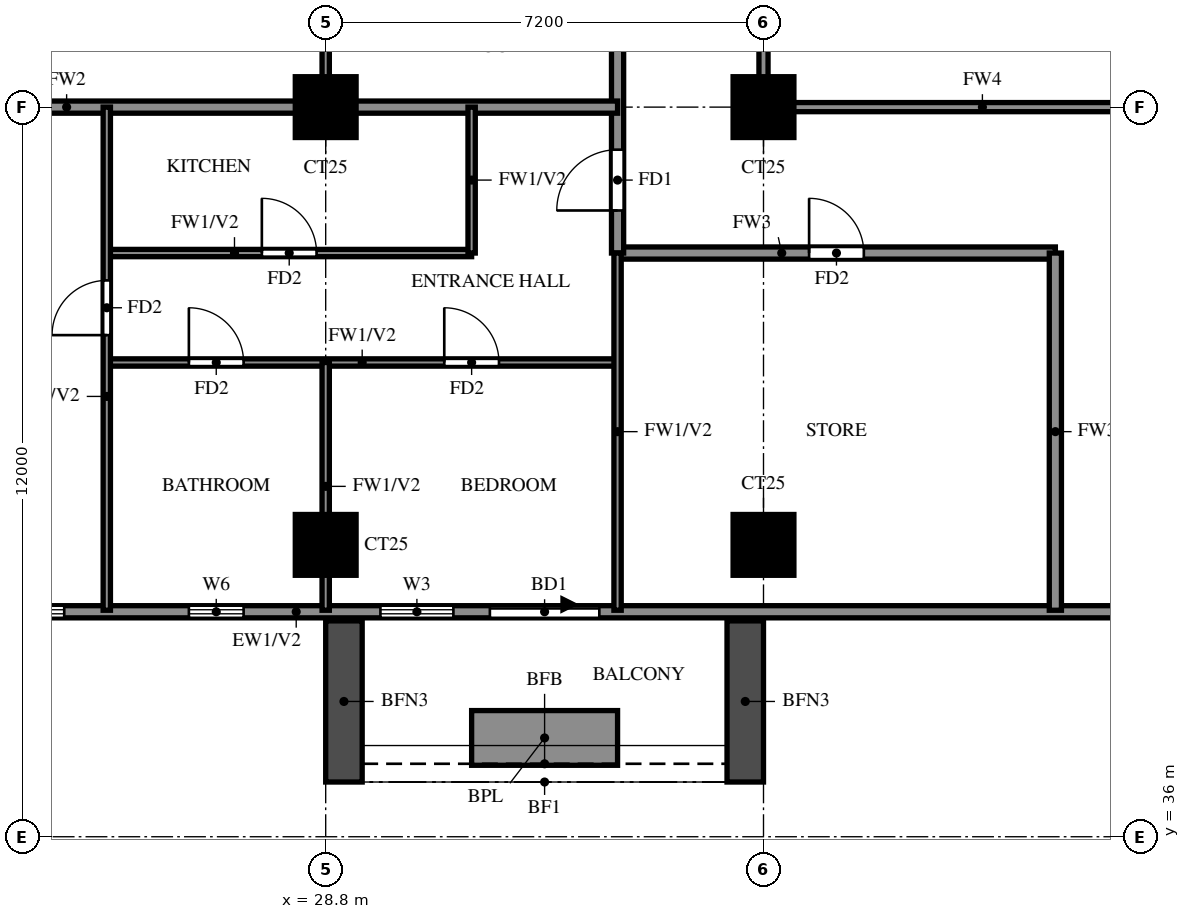
"""IFC4 building model, lengths in metres.
Left out: names, types, materials, properties, quantities, classifications, styles, units other than length and angle.
Written with IfcOpenShell. Run it as: python <this file> out.ifc"""

import sys

from ifc_helpers import new_model, si_unit, direction, frame, frame_2d, origin, origin_2d, place, context, subcontext, project, spatial, rectangle, extrude, source, transform, mapped, element, fill, save


model = new_model("IFC4")
c1 = context("Model", 3, precision=1e-05, world=origin(), true_north=direction((0.0, 1.0)))
c2 = subcontext(c1, "Body", "Model", "MODEL_VIEW")
j1 = project(units=[si_unit("LENGTHUNIT", "METRE"), si_unit("PLANEANGLEUNIT", "RADIAN")], contexts=[c1])
p1 = place(None, origin())
s1 = spatial("IfcSite", under=j1, at=p1, CompositionType="ELEMENT")
p2 = place(p1, origin())
s2 = spatial("IfcBuilding", under=s1, at=p2, CompositionType="ELEMENT")
p3 = place(p2, frame((0.0, 0.0, 150.0)))
s3 = spatial("IfcBuildingStorey", under=s2, at=p3, CompositionType="ELEMENT", Elevation=150.0)
m1 = source(origin(), c2, "Body", "SweptSolid", [
    extrude(rectangle(XDim=1.0, YDim=1.0, at=origin_2d()), origin(), (0.0, 0.0, 1.0), 3.2),
])
for number, where, z_axis, x_axis in (
    (1, (28.8, 40.8, 0.0), (0.0, 0.0, 1.0), (1.0, 0.0, 0.0)),
    (2, (36.0, 40.8, 0.0), (0.0, 0.0, 1.0), (1.0, 0.0, 0.0)),
    (3, (28.8, 48.0, 0.0), (0.0, 0.0, 1.0), (1.0, 0.0, 0.0)),
    (4, (36.0, 48.0, 0.0), (0.0, 0.0, 1.0), (1.0, 0.0, 0.0)),
):
    element("IfcColumn", number, at=place(p3, frame(where, z_axis=z_axis, x_axis=x_axis)), inside=s3, PredefinedType="COLUMN", context=c2, shape_type="MappedRepresentation", body=[
        mapped(m1, transform((0.0, 0.0, 0.0))),
    ])
p4 = place(p3, frame((18.2, 39.7, 0.0), z_axis=(0.0, 0.0, 1.0), x_axis=(1.0, 0.0, 0.0)))
e5 = element("IfcWall", 5, at=p4, inside=s3, PredefinedType="SOLIDWALL", context=c2, shape_type="SweptSolid", body=[
    extrude(rectangle(XDim=23.8, YDim=0.2, at=frame_2d((11.9, 0.0))), origin(), (0.0, 0.0, 1.0), 3.2),
])
p5 = place(p4, frame((13.3, 0.0, 0.0)))
e6 = element("IfcOpeningElement", 6, at=p5, cuts=e5, PredefinedType="OPENING", context=c2, shape_type="SweptSolid", body=[
    extrude(rectangle(XDim=1.8, YDim=2.4, at=frame_2d((0.9, 1.2))), frame((0.0, 0.11, 0.0), z_axis=(0.0, -1.0, 0.0), x_axis=(1.0, 0.0, 0.0)), (0.0, 0.0, 1.0), 0.22),
])
p6 = place(p4, frame((0.9, 0.0, 0.6)))
e7 = element("IfcOpeningElement", 7, at=p6, cuts=e5, PredefinedType="OPENING", context=c2, shape_type="SweptSolid", body=[
    extrude(rectangle(XDim=2.4, YDim=2.4, at=frame_2d((1.2, 1.2))), frame((0.0, 0.11, 0.0), z_axis=(0.0, -1.0, 0.0), x_axis=(1.0, 0.0, 0.0)), (0.0, 0.0, 1.0), 0.22),
])
p7 = place(p4, frame((3.9, 0.0, 0.6)))
e8 = element("IfcOpeningElement", 8, at=p7, cuts=e5, PredefinedType="OPENING", context=c2, shape_type="SweptSolid", body=[
    extrude(rectangle(XDim=2.4, YDim=2.4, at=frame_2d((1.2, 1.2))), frame((0.0, 0.11, 0.0), z_axis=(0.0, -1.0, 0.0), x_axis=(1.0, 0.0, 0.0)), (0.0, 0.0, 1.0), 0.22),
])
p8 = place(p4, frame((8.35, 0.0, 1.5)))
e9 = element("IfcOpeningElement", 9, at=p8, cuts=e5, PredefinedType="OPENING", context=c2, shape_type="SweptSolid", body=[
    extrude(rectangle(XDim=0.9, YDim=0.9, at=frame_2d((0.45, 0.45))), frame((0.0, 0.11, 0.0), z_axis=(0.0, -1.0, 0.0), x_axis=(1.0, 0.0, 0.0)), (0.0, 0.0, 1.0), 0.22),
])
p9 = place(p4, frame((11.5, 0.0, 0.6)))
e10 = element("IfcOpeningElement", 10, at=p9, cuts=e5, PredefinedType="OPENING", context=c2, shape_type="SweptSolid", body=[
    extrude(rectangle(XDim=1.2, YDim=2.4, at=frame_2d((0.6, 1.2))), frame((0.0, 0.11, 0.0), z_axis=(0.0, -1.0, 0.0), x_axis=(1.0, 0.0, 0.0)), (0.0, 0.0, 1.0), 0.22),
])
for number, where, z_axis, x_axis in (
    (11, (29.1, 39.55, 0.0), (0.0, 0.0, 1.0), (0.0, -1.0, 0.0)),
    (12, (35.7, 39.55, 0.0), (0.0, 0.0, 1.0), (0.0, -1.0, 0.0)),
):
    element("IfcWall", number, at=place(p3, frame(where, z_axis=z_axis, x_axis=x_axis)), inside=s3, PredefinedType="SOLIDWALL", context=c2, shape_type="SweptSolid", body=[
        extrude(rectangle(XDim=2.65, YDim=0.6, at=frame_2d((1.325, 0.0))), origin(), (0.0, 0.0, 1.0), 2.85),
    ])
p10 = place(p3, frame((31.2, 37.625, 0.0), z_axis=(0.0, 0.0, 1.0), x_axis=(1.0, 0.0, 0.0)))
e13 = element("IfcWall", 13, at=p10, inside=s3, PredefinedType="SOLIDWALL", context=c2, shape_type="SweptSolid", body=[
    extrude(rectangle(XDim=2.4, YDim=0.9, at=frame_2d((1.2, 0.0))), origin(), (0.0, 0.0, 1.0), 0.9),
])
p11 = place(p3, frame((33.6, 45.6, 0.0), z_axis=(0.0, 0.0, 1.0), x_axis=(1.0, 0.0, 0.0)))
e14 = element("IfcWall", 14, at=p11, inside=s3, PredefinedType="SOLIDWALL", context=c2, shape_type="SweptSolid", body=[
    extrude(rectangle(XDim=7.2, YDim=0.2, at=frame_2d((3.6, 0.0))), origin(), (0.0, 0.0, 1.0), 3.2),
])
p12 = place(p11, frame((3.15, 0.0, 0.0)))
e15 = element("IfcOpeningElement", 15, at=p12, cuts=e14, PredefinedType="OPENING", context=c2, shape_type="SweptSolid", body=[
    extrude(rectangle(XDim=0.9, YDim=2.1, at=frame_2d((0.45, 1.05))), frame((0.0, 0.11, 0.0), z_axis=(0.0, -1.0, 0.0), x_axis=(1.0, 0.0, 0.0)), (0.0, 0.0, 1.0), 0.22),
])
p13 = place(p3, frame((33.6, 45.6, 0.0), z_axis=(0.0, 0.0, 1.0), x_axis=(0.0, 1.0, 0.0)))
e16 = element("IfcWall", 16, at=p13, inside=s3, PredefinedType="SOLIDWALL", context=c2, shape_type="SweptSolid", body=[
    extrude(rectangle(XDim=16.8, YDim=0.2, at=frame_2d((8.4, 0.0))), origin(), (0.0, 0.0, 1.0), 3.2),
])
p14 = place(p13, frame((0.7, 0.0, 0.0)))
e17 = element("IfcOpeningElement", 17, at=p14, cuts=e16, PredefinedType="OPENING", context=c2, shape_type="SweptSolid", body=[
    extrude(rectangle(XDim=1.0, YDim=2.1, at=frame_2d((0.5, 1.05))), frame((0.0, 0.11, 0.0), z_axis=(0.0, -1.0, 0.0), x_axis=(1.0, 0.0, 0.0)), (0.0, 0.0, 1.0), 0.22),
])
p15 = place(p13, frame((6.7, 0.0, 0.0)))
e18 = element("IfcOpeningElement", 18, at=p15, cuts=e16, PredefinedType="OPENING", context=c2, shape_type="SweptSolid", body=[
    extrude(rectangle(XDim=1.0, YDim=2.1, at=frame_2d((0.5, 1.05))), frame((0.0, 0.11, 0.0), z_axis=(0.0, -1.0, 0.0), x_axis=(1.0, 0.0, 0.0)), (0.0, 0.0, 1.0), 0.22),
])
p16 = place(p13, frame((15.1, 0.0, 0.0)))
e19 = element("IfcOpeningElement", 19, at=p16, cuts=e16, PredefinedType="OPENING", context=c2, shape_type="SweptSolid", body=[
    extrude(rectangle(XDim=1.0, YDim=2.1, at=frame_2d((0.5, 1.05))), frame((0.0, 0.11, 0.0), z_axis=(0.0, -1.0, 0.0), x_axis=(1.0, 0.0, 0.0)), (0.0, 0.0, 1.0), 0.22),
])
p17 = place(p3, frame((40.8, 39.725, 0.0), z_axis=(0.0, 0.0, 1.0), x_axis=(0.0, 1.0, 0.0)))
e20 = element("IfcWall", 20, at=p17, inside=s3, PredefinedType="SOLIDWALL", context=c2, shape_type="SweptSolid", body=[
    extrude(rectangle(XDim=5.875, YDim=0.2, at=frame_2d((2.938, 0.0))), origin(), (0.0, 0.0, 1.0), 3.2),
])
p18 = place(p3, frame((14.525, 48.0, 0.0), z_axis=(0.0, 0.0, 1.0), x_axis=(1.0, 0.0, 0.0)))
e21 = element("IfcWall", 21, at=p18, inside=s3, PredefinedType="SOLIDWALL", context=c2, shape_type="SweptSolid", body=[
    extrude(rectangle(XDim=19.075, YDim=0.2, at=frame_2d((9.538, 0.0))), origin(), (0.0, 0.0, 1.0), 3.2),
])
p19 = place(p3, frame((25.2, 43.8, 0.0), z_axis=(0.0, 0.0, 1.0), x_axis=(1.0, 0.0, 0.0)))
e22 = element("IfcWall", 22, at=p19, inside=s3, PredefinedType="PARTITIONING", context=c2, shape_type="SweptSolid", body=[
    extrude(rectangle(XDim=8.4, YDim=0.12, at=frame_2d((4.2, 0.0))), origin(), (0.0, 0.0, 1.0), 3.2),
])
p20 = place(p19, frame((1.35, 0.0, 0.0)))
e23 = element("IfcOpeningElement", 23, at=p20, cuts=e22, PredefinedType="OPENING", context=c2, shape_type="SweptSolid", body=[
    extrude(rectangle(XDim=0.9, YDim=2.1, at=frame_2d((0.45, 1.05))), frame((0.0, 0.07, 0.0), z_axis=(0.0, -1.0, 0.0), x_axis=(1.0, 0.0, 0.0)), (0.0, 0.0, 1.0), 0.14),
])
p21 = place(p19, frame((5.55, 0.0, 0.0)))
e24 = element("IfcOpeningElement", 24, at=p21, cuts=e22, PredefinedType="OPENING", context=c2, shape_type="SweptSolid", body=[
    extrude(rectangle(XDim=0.9, YDim=2.1, at=frame_2d((0.45, 1.05))), frame((0.0, 0.07, 0.0), z_axis=(0.0, -1.0, 0.0), x_axis=(1.0, 0.0, 0.0)), (0.0, 0.0, 1.0), 0.14),
])
p22 = place(p3, frame((25.2, 45.6, 0.0), z_axis=(0.0, 0.0, 1.0), x_axis=(1.0, 0.0, 0.0)))
e25 = element("IfcWall", 25, at=p22, inside=s3, PredefinedType="PARTITIONING", context=c2, shape_type="SweptSolid", body=[
    extrude(rectangle(XDim=6.0, YDim=0.12, at=frame_2d((3.0, 0.0))), origin(), (0.0, 0.0, 1.0), 3.2),
])
p23 = place(p22, frame((2.55, 0.0, 0.0)))
e26 = element("IfcOpeningElement", 26, at=p23, cuts=e25, PredefinedType="OPENING", context=c2, shape_type="SweptSolid", body=[
    extrude(rectangle(XDim=0.9, YDim=2.1, at=frame_2d((0.45, 1.05))), frame((0.0, 0.07, 0.0), z_axis=(0.0, -1.0, 0.0), x_axis=(1.0, 0.0, 0.0)), (0.0, 0.0, 1.0), 0.14),
])
p24 = place(p3, frame((25.2, 39.725, 0.0), z_axis=(0.0, 0.0, 1.0), x_axis=(0.0, 1.0, 0.0)))
e27 = element("IfcWall", 27, at=p24, inside=s3, PredefinedType="PARTITIONING", context=c2, shape_type="SweptSolid", body=[
    extrude(rectangle(XDim=8.275, YDim=0.12, at=frame_2d((4.137, 0.0))), origin(), (0.0, 0.0, 1.0), 3.2),
])
p25 = place(p24, frame((4.525, 0.0, 0.0)))
e28 = element("IfcOpeningElement", 28, at=p25, cuts=e27, PredefinedType="OPENING", context=c2, shape_type="SweptSolid", body=[
    extrude(rectangle(XDim=0.9, YDim=2.1, at=frame_2d((0.45, 1.05))), frame((0.0, 0.07, 0.0), z_axis=(0.0, -1.0, 0.0), x_axis=(1.0, 0.0, 0.0)), (0.0, 0.0, 1.0), 0.14),
])
p26 = place(p3, frame((28.8, 39.725, 0.0), z_axis=(0.0, 0.0, 1.0), x_axis=(0.0, 1.0, 0.0)))
e29 = element("IfcWall", 29, at=p26, inside=s3, PredefinedType="PARTITIONING", context=c2, shape_type="SweptSolid", body=[
    extrude(rectangle(XDim=4.075, YDim=0.12, at=frame_2d((2.038, 0.0))), origin(), (0.0, 0.0, 1.0), 3.2),
])
p27 = place(p3, frame((28.8, 48.0, 0.0), z_axis=(0.0, 0.0, 1.0), x_axis=(0.0, 1.0, 0.0)))
e30 = element("IfcWall", 30, at=p27, inside=s3, PredefinedType="PARTITIONING", context=c2, shape_type="SweptSolid", body=[
    extrude(rectangle(XDim=3.6, YDim=0.12, at=frame_2d((1.8, 0.0))), origin(), (0.0, 0.0, 1.0), 3.2),
])
p28 = place(p3, frame((31.2, 45.6, 0.0), z_axis=(0.0, 0.0, 1.0), x_axis=(0.0, 1.0, 0.0)))
e31 = element("IfcWall", 31, at=p28, inside=s3, PredefinedType="PARTITIONING", context=c2, shape_type="SweptSolid", body=[
    extrude(rectangle(XDim=2.4, YDim=0.12, at=frame_2d((1.2, 0.0))), origin(), (0.0, 0.0, 1.0), 3.2),
])
p29 = place(p3, frame((33.6, 39.725, 0.0), z_axis=(0.0, 0.0, 1.0), x_axis=(0.0, 1.0, 0.0)))
e32 = element("IfcWall", 32, at=p29, inside=s3, PredefinedType="PARTITIONING", context=c2, shape_type="SweptSolid", body=[
    extrude(rectangle(XDim=5.875, YDim=0.12, at=frame_2d((2.938, 0.0))), origin(), (0.0, 0.0, 1.0), 3.2),
])
p30 = place(p3, frame((36.0, 48.0, 0.0), z_axis=(0.0, 0.0, 1.0), x_axis=(1.0, 0.0, 0.0)))
e33 = element("IfcWall", 33, at=p30, inside=s3, PredefinedType="SOLIDWALL", context=c2, shape_type="SweptSolid", body=[
    extrude(rectangle(XDim=7.2, YDim=0.15, at=frame_2d((3.6, 0.0))), origin(), (0.0, 0.0, 1.0), 2.3),
])
p31 = place(p3, frame((36.0, 48.0, 0.0), z_axis=(0.0, 0.0, 1.0), x_axis=(0.0, 1.0, 0.0)))
e34 = element("IfcWall", 34, at=p31, inside=s3, PredefinedType="SOLIDWALL", context=c2, shape_type="SweptSolid", body=[
    extrude(rectangle(XDim=14.4, YDim=0.15, at=frame_2d((7.2, 0.0))), origin(), (0.0, 0.0, 1.0), 2.3),
])
p32 = place(p5, origin())
e35 = element("IfcDoor", 35, at=p32, inside=s3, OperationType="DOUBLE_DOOR_SLIDING", PredefinedType="DOOR", context=c2, shape_type="SweptSolid", body=[
    extrude(rectangle(XDim=1.8, YDim=2.4, at=frame_2d((0.9, 1.2))), frame((0.0, 0.025, 0.0), z_axis=(0.0, -1.0, 0.0), x_axis=(1.0, 0.0, 0.0)), (0.0, 0.0, 1.0), 0.05),
])
fill(e6, e35)
p33 = place(p7, origin())
e36 = element("IfcWindow", 36, at=p33, inside=s3, PartitioningType="DOUBLE_PANEL_VERTICAL", PredefinedType="WINDOW", context=c2, shape_type="SweptSolid", body=[
    extrude(rectangle(XDim=2.4, YDim=2.4, at=frame_2d((1.2, 1.2))), frame((0.0, 0.03, 0.0), z_axis=(0.0, -1.0, 0.0), x_axis=(1.0, 0.0, 0.0)), (0.0, 0.0, 1.0), 0.06),
])
fill(e8, e36)
p34 = place(p8, origin())
e37 = element("IfcWindow", 37, at=p34, inside=s3, PartitioningType="SINGLE_PANEL", PredefinedType="WINDOW", context=c2, shape_type="SweptSolid", body=[
    extrude(rectangle(XDim=0.9, YDim=0.9, at=frame_2d((0.45, 0.45))), frame((0.0, 0.03, 0.0), z_axis=(0.0, -1.0, 0.0), x_axis=(1.0, 0.0, 0.0)), (0.0, 0.0, 1.0), 0.06),
])
fill(e9, e37)
p35 = place(p9, origin())
e38 = element("IfcWindow", 38, at=p35, inside=s3, PartitioningType="SINGLE_PANEL", PredefinedType="WINDOW", context=c2, shape_type="SweptSolid", body=[
    extrude(rectangle(XDim=1.2, YDim=2.4, at=frame_2d((0.6, 1.2))), frame((0.0, 0.03, 0.0), z_axis=(0.0, -1.0, 0.0), x_axis=(1.0, 0.0, 0.0)), (0.0, 0.0, 1.0), 0.06),
])
fill(e10, e38)
p36 = place(p14, origin())
e39 = element("IfcDoor", 39, at=p36, inside=s3, OperationType="SINGLE_SWING_RIGHT", PredefinedType="DOOR", context=c2, shape_type="SweptSolid", body=[
    extrude(rectangle(XDim=1.0, YDim=2.1, at=frame_2d((0.5, 1.05))), frame((0.0, 0.025, 0.0), z_axis=(0.0, -1.0, 0.0), x_axis=(1.0, 0.0, 0.0)), (0.0, 0.0, 1.0), 0.05),
])
fill(e17, e39)
p37 = place(p25, origin())
e40 = element("IfcDoor", 40, at=p37, inside=s3, OperationType="SINGLE_SWING_LEFT", PredefinedType="DOOR", context=c2, shape_type="SweptSolid", body=[
    extrude(rectangle(XDim=0.9, YDim=2.1, at=frame_2d((0.45, 1.05))), frame((0.0, 0.025, 0.0), z_axis=(0.0, -1.0, 0.0), x_axis=(1.0, 0.0, 0.0)), (0.0, 0.0, 1.0), 0.05),
])
fill(e28, e40)
p38 = place(p20, origin())
e41 = element("IfcDoor", 41, at=p38, inside=s3, OperationType="SINGLE_SWING_LEFT", PredefinedType="DOOR", context=c2, shape_type="SweptSolid", body=[
    extrude(rectangle(XDim=0.9, YDim=2.1, at=frame_2d((0.45, 1.05))), frame((0.0, 0.025, 0.0), z_axis=(0.0, -1.0, 0.0), x_axis=(1.0, 0.0, 0.0)), (0.0, 0.0, 1.0), 0.05),
])
fill(e23, e41)
p39 = place(p21, origin())
e42 = element("IfcDoor", 42, at=p39, inside=s3, OperationType="SINGLE_SWING_RIGHT", PredefinedType="DOOR", context=c2, shape_type="SweptSolid", body=[
    extrude(rectangle(XDim=0.9, YDim=2.1, at=frame_2d((0.45, 1.05))), frame((0.0, 0.025, 0.0), z_axis=(0.0, -1.0, 0.0), x_axis=(1.0, 0.0, 0.0)), (0.0, 0.0, 1.0), 0.05),
])
fill(e24, e42)
p40 = place(p23, origin())
e43 = element("IfcDoor", 43, at=p40, inside=s3, OperationType="SINGLE_SWING_LEFT", PredefinedType="DOOR", context=c2, shape_type="SweptSolid", body=[
    extrude(rectangle(XDim=0.9, YDim=2.1, at=frame_2d((0.45, 1.05))), frame((0.0, 0.025, 0.0), z_axis=(0.0, -1.0, 0.0), x_axis=(1.0, 0.0, 0.0)), (0.0, 0.0, 1.0), 0.05),
])
fill(e26, e43)
p41 = place(p12, origin())
e44 = element("IfcDoor", 44, at=p41, inside=s3, OperationType="SINGLE_SWING_LEFT", PredefinedType="DOOR", context=c2, shape_type="SweptSolid", body=[
    extrude(rectangle(XDim=0.9, YDim=2.1, at=frame_2d((0.45, 1.05))), frame((0.0, 0.025, 0.0), z_axis=(0.0, -1.0, 0.0), x_axis=(1.0, 0.0, 0.0)), (0.0, 0.0, 1.0), 0.05),
])
fill(e15, e44)
save(model, sys.argv[1])
